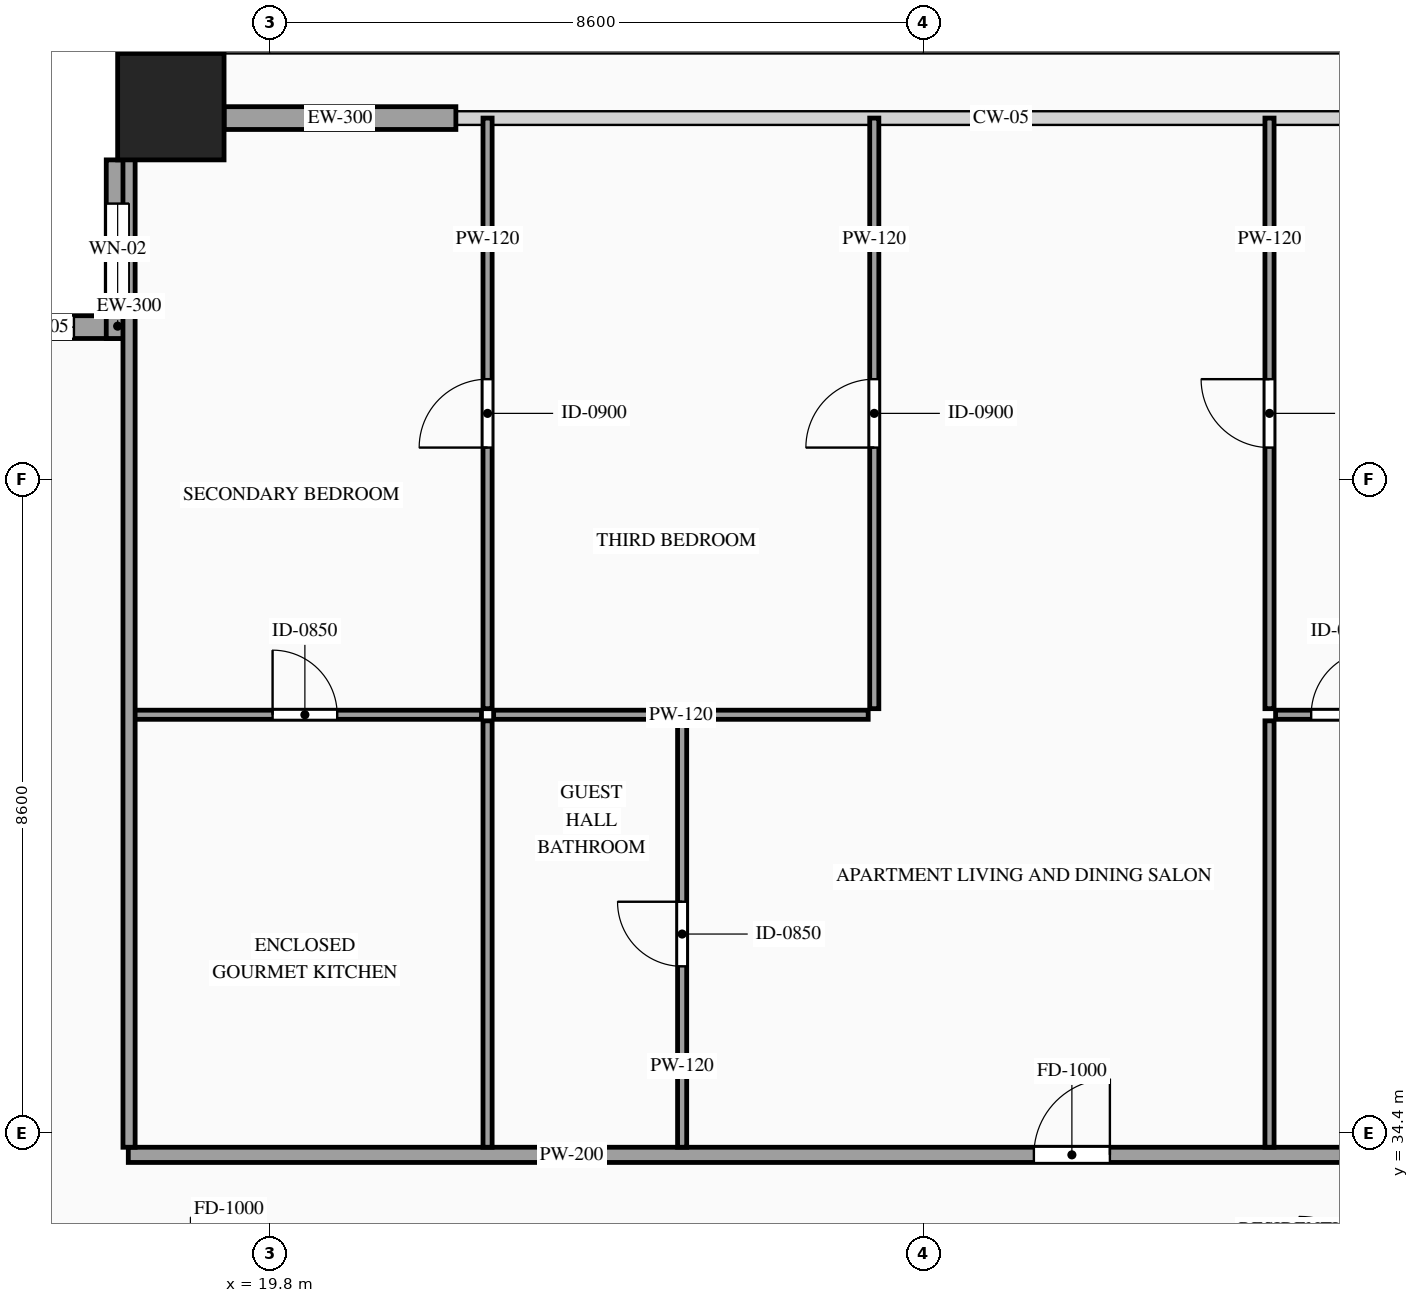
"""IFC4 building model, lengths in metres.
Left out: names, types, materials, properties, quantities, classifications, styles, units other than length and angle.
Written with IfcOpenShell. Run it as: python <this file> out.ifc"""

import sys

from ifc_helpers import new_model, si_unit, direction, frame, frame_2d, origin, origin_2d, place, context, subcontext, project, spatial, rectangle, hollow_rectangle, extrude, source, transform, mapped, element, fill, save


model = new_model("IFC4")
c1 = context("Model", 3, precision=1e-05, world=origin(), true_north=direction((0.0, 1.0)))
c2 = subcontext(c1, "Body", "Model", "MODEL_VIEW")
j1 = project(units=[si_unit("LENGTHUNIT", "METRE"), si_unit("PLANEANGLEUNIT", "RADIAN")], contexts=[c1])
p1 = place(None, origin())
s1 = spatial("IfcSite", under=j1, at=p1, CompositionType="ELEMENT")
p2 = place(p1, origin())
s2 = spatial("IfcBuilding", under=s1, at=p2, CompositionType="ELEMENT")
p3 = place(p2, frame((0.0, 0.0, 191.5)))
s3 = spatial("IfcBuildingStorey", under=s2, at=p3, CompositionType="ELEMENT", Elevation=191.5)
m1 = source(origin(), c2, "Body", "SweptSolid", [
    extrude(hollow_rectangle(XDim=1.4, YDim=1.4, WallThickness=0.06, at=origin_2d()), origin(), (0.0, 0.0, 1.0), 3.5),
])
p4 = place(p3, frame((18.5, 47.9, 0.0), z_axis=(0.0, 0.0, 1.0), x_axis=(1.0, 0.0, 0.0)))
e1 = element("IfcColumn", 1, at=p4, inside=s3, PredefinedType="COLUMN", context=c2, shape_type="MappedRepresentation", body=[
    mapped(m1, transform((0.0, 0.0, 0.0), scale=1.0)),
])
p5 = place(p3, frame((17.95, 45.0, 0.0), z_axis=(0.0, 0.0, 1.0), x_axis=(-1.0, 0.0, 0.0)))
e2 = element("IfcWall", 2, at=p5, inside=s3, PredefinedType="SOLIDWALL", context=c2, shape_type="SweptSolid", body=[
    extrude(rectangle(XDim=2.35, YDim=0.3, at=frame_2d((1.175, 0.0))), origin(), (0.0, 0.0, 1.0), 3.28),
])
p6 = place(p5, frame((0.725, 0.0, 0.85)))
e3 = element("IfcOpeningElement", 3, at=p6, cuts=e2, PredefinedType="OPENING", context=c2, shape_type="SweptSolid", body=[
    extrude(rectangle(XDim=0.9, YDim=1.5, at=frame_2d((0.45, 0.75))), frame((0.0, 0.165, 0.0), z_axis=(0.0, -1.0, 0.0), x_axis=(1.0, 0.0, 0.0)), (0.0, 0.0, 1.0), 0.33),
])
p7 = place(p3, frame((17.8, 47.2, 0.0), z_axis=(0.0, 0.0, 1.0), x_axis=(0.0, -1.0, 0.0)))
e4 = element("IfcWall", 4, at=p7, inside=s3, PredefinedType="SOLIDWALL", context=c2, shape_type="SweptSolid", body=[
    extrude(rectangle(XDim=2.35, YDim=0.3, at=frame_2d((1.175, 0.0))), origin(), (0.0, 0.0, 1.0), 3.28),
])
p8 = place(p7, frame((0.575, 0.0, 0.85)))
e5 = element("IfcOpeningElement", 5, at=p8, cuts=e4, PredefinedType="OPENING", context=c2, shape_type="SweptSolid", body=[
    extrude(rectangle(XDim=1.2, YDim=2.1, at=frame_2d((0.6, 1.05))), frame((0.0, 0.165, 0.0), z_axis=(0.0, -1.0, 0.0), x_axis=(1.0, 0.0, 0.0)), (0.0, 0.0, 1.0), 0.33),
])
m2 = source(origin(), c2, "Body", "SweptSolid", [
    extrude(rectangle(XDim=3.05, YDim=0.3, at=frame_2d((1.525, 0.0))), origin(), (0.0, 0.0, 1.0), 2.835),
])
p9 = place(p3, frame((19.2, 47.75, 0.0), z_axis=(0.0, 0.0, 1.0), x_axis=(1.0, 0.0, 0.0)))
e6 = element("IfcWall", 6, at=p9, inside=s3, PredefinedType="SOLIDWALL", context=c2, shape_type="MappedRepresentation", body=[
    mapped(m2, transform((0.0, 0.0, 0.0), scale=1.0)),
])
p10 = place(p3, frame((17.94, 34.11, 0.0), z_axis=(0.0, 0.0, 1.0), x_axis=(1.0, 0.0, 0.0)))
e7 = element("IfcWall", 7, at=p10, inside=s3, PredefinedType="PARTITIONING", context=c2, shape_type="SweptSolid", body=[
    extrude(rectangle(XDim=19.742, YDim=0.2, at=frame_2d((9.871, 0.0))), origin(), (0.0, 0.0, 1.0), 3.28),
])
p11 = place(p10, frame((11.915, 0.0, 0.0)))
e8 = element("IfcOpeningElement", 8, at=p11, cuts=e7, PredefinedType="OPENING", context=c2, shape_type="SweptSolid", body=[
    extrude(rectangle(XDim=1.0, YDim=2.2, at=frame_2d((0.5, 1.1))), frame((0.0, 0.115, 0.0), z_axis=(0.0, -1.0, 0.0), x_axis=(1.0, 0.0, 0.0)), (0.0, 0.0, 1.0), 0.23),
])
p12 = place(p3, frame((17.94, 39.9, 0.0), z_axis=(0.0, 0.0, 1.0), x_axis=(1.0, 0.0, 0.0)))
e9 = element("IfcWall", 9, at=p12, inside=s3, PredefinedType="PARTITIONING", context=c2, shape_type="SweptSolid", body=[
    extrude(rectangle(XDim=4.647, YDim=0.12, at=frame_2d((2.323, 0.0))), origin(), (0.0, 0.0, 1.0), 3.28),
])
p13 = place(p12, frame((1.898, 0.0, 0.0)))
e10 = element("IfcOpeningElement", 10, at=p13, cuts=e9, PredefinedType="OPENING", context=c2, shape_type="SweptSolid", body=[
    extrude(rectangle(XDim=0.85, YDim=2.1, at=frame_2d((0.425, 1.05))), frame((0.0, 0.075, 0.0), z_axis=(0.0, -1.0, 0.0), x_axis=(1.0, 0.0, 0.0)), (0.0, 0.0, 1.0), 0.15),
])
m3 = source(origin(), c2, "Body", "SweptSolid", [
    extrude(rectangle(XDim=5.61, YDim=0.12, at=frame_2d((2.805, 0.0))), origin(), (0.0, 0.0, 1.0), 3.28),
])
p14 = place(p3, frame((22.667, 34.21, 0.0), z_axis=(0.0, 0.0, 1.0), x_axis=(0.0, 1.0, 0.0)))
e11 = element("IfcWall", 11, at=p14, inside=s3, PredefinedType="PARTITIONING", context=c2, shape_type="MappedRepresentation", body=[
    mapped(m3, transform((0.0, 0.0, 0.0), scale=1.0)),
])
p15 = place(p3, frame((25.227, 34.21, 0.0), z_axis=(0.0, 0.0, 1.0), x_axis=(0.0, 1.0, 0.0)))
e12 = element("IfcWall", 12, at=p15, inside=s3, PredefinedType="PARTITIONING", context=c2, shape_type="SweptSolid", body=[
    extrude(rectangle(XDim=5.61, YDim=0.12, at=frame_2d((2.805, 0.0))), origin(), (0.0, 0.0, 1.0), 3.28),
])
p16 = place(p15, frame((2.38, 0.0, 0.0)))
e13 = element("IfcOpeningElement", 13, at=p16, cuts=e12, PredefinedType="OPENING", context=c2, shape_type="SweptSolid", body=[
    extrude(rectangle(XDim=0.85, YDim=2.1, at=frame_2d((0.425, 1.05))), frame((0.0, 0.075, 0.0), z_axis=(0.0, -1.0, 0.0), x_axis=(1.0, 0.0, 0.0)), (0.0, 0.0, 1.0), 0.15),
])
p17 = place(p3, frame((32.955, 34.21, 0.0), z_axis=(0.0, 0.0, 1.0), x_axis=(0.0, 1.0, 0.0)))
e14 = element("IfcWall", 14, at=p17, inside=s3, PredefinedType="PARTITIONING", context=c2, shape_type="MappedRepresentation", body=[
    mapped(m3, transform((0.0, 0.0, 0.0), scale=1.0)),
])
p18 = place(p3, frame((22.667, 39.98, 0.0), z_axis=(0.0, 0.0, 1.0), x_axis=(0.0, 1.0, 0.0)))
e15 = element("IfcWall", 15, at=p18, inside=s3, PredefinedType="PARTITIONING", context=c2, shape_type="SweptSolid", body=[
    extrude(rectangle(XDim=7.77, YDim=0.12, at=frame_2d((3.885, 0.0))), origin(), (0.0, 0.0, 1.0), 3.28),
])
p19 = place(p18, frame((3.435, 0.0, 0.0)))
e16 = element("IfcOpeningElement", 16, at=p19, cuts=e15, PredefinedType="OPENING", context=c2, shape_type="SweptSolid", body=[
    extrude(rectangle(XDim=0.9, YDim=2.15, at=frame_2d((0.45, 1.075))), frame((0.0, 0.075, 0.0), z_axis=(0.0, -1.0, 0.0), x_axis=(1.0, 0.0, 0.0)), (0.0, 0.0, 1.0), 0.15),
])
p20 = place(p3, frame((33.035, 39.9, 0.0), z_axis=(0.0, 0.0, 1.0), x_axis=(1.0, 0.0, 0.0)))
e17 = element("IfcWall", 17, at=p20, inside=s3, PredefinedType="PARTITIONING", context=c2, shape_type="SweptSolid", body=[
    extrude(rectangle(XDim=4.647, YDim=0.12, at=frame_2d((2.323, 0.0))), origin(), (0.0, 0.0, 1.0), 2.875),
])
p21 = place(p20, frame((2.872, 0.0, 0.0)))
e18 = element("IfcOpeningElement", 18, at=p21, cuts=e17, PredefinedType="OPENING", context=c2, shape_type="SweptSolid", body=[
    extrude(rectangle(XDim=0.85, YDim=2.1, at=frame_2d((0.425, 1.05))), frame((0.0, 0.075, 0.0), z_axis=(0.0, -1.0, 0.0), x_axis=(1.0, 0.0, 0.0)), (0.0, 0.0, 1.0), 0.15),
])
p22 = place(p20, frame((0.469, 0.0, 0.0)))
e19 = element("IfcOpeningElement", 19, at=p22, cuts=e17, PredefinedType="OPENING", context=c2, shape_type="SweptSolid", body=[
    extrude(rectangle(XDim=0.85, YDim=2.1, at=frame_2d((0.425, 1.05))), frame((0.0, 0.075, 0.0), z_axis=(0.0, -1.0, 0.0), x_axis=(1.0, 0.0, 0.0)), (0.0, 0.0, 1.0), 0.15),
])
p23 = place(p3, frame((32.955, 39.98, 0.0), z_axis=(0.0, 0.0, 1.0), x_axis=(0.0, 1.0, 0.0)))
e20 = element("IfcWall", 20, at=p23, inside=s3, PredefinedType="PARTITIONING", context=c2, shape_type="SweptSolid", body=[
    extrude(rectangle(XDim=7.77, YDim=0.12, at=frame_2d((3.885, 0.0))), origin(), (0.0, 0.0, 1.0), 3.28),
])
p24 = place(p23, frame((3.435, 0.0, 0.0)))
e21 = element("IfcOpeningElement", 21, at=p24, cuts=e20, PredefinedType="OPENING", context=c2, shape_type="SweptSolid", body=[
    extrude(rectangle(XDim=0.9, YDim=2.15, at=frame_2d((0.45, 1.075))), frame((0.0, 0.075, 0.0), z_axis=(0.0, -1.0, 0.0), x_axis=(1.0, 0.0, 0.0)), (0.0, 0.0, 1.0), 0.15),
])
m4 = source(origin(), c2, "Body", "SweptSolid", [
    extrude(rectangle(XDim=4.928, YDim=0.12, at=frame_2d((2.464, 0.0))), origin(), (0.0, 0.0, 1.0), 2.875),
])
p25 = place(p3, frame((22.747, 39.9, 0.0), z_axis=(0.0, 0.0, 1.0), x_axis=(1.0, 0.0, 0.0)))
e22 = element("IfcWall", 22, at=p25, inside=s3, PredefinedType="PARTITIONING", context=c2, shape_type="MappedRepresentation", body=[
    mapped(m4, transform((0.0, 0.0, 0.0), scale=1.0)),
])
p26 = place(p3, frame((27.755, 39.98, 0.0), z_axis=(0.0, 0.0, 1.0), x_axis=(0.0, 1.0, 0.0)))
e23 = element("IfcWall", 23, at=p26, inside=s3, PredefinedType="PARTITIONING", context=c2, shape_type="SweptSolid", body=[
    extrude(rectangle(XDim=7.77, YDim=0.12, at=frame_2d((3.885, 0.0))), origin(), (0.0, 0.0, 1.0), 3.28),
])
p27 = place(p26, frame((3.435, 0.0, 0.0)))
e24 = element("IfcOpeningElement", 24, at=p27, cuts=e23, PredefinedType="OPENING", context=c2, shape_type="SweptSolid", body=[
    extrude(rectangle(XDim=0.9, YDim=2.15, at=frame_2d((0.45, 1.075))), frame((0.0, 0.075, 0.0), z_axis=(0.0, -1.0, 0.0), x_axis=(1.0, 0.0, 0.0)), (0.0, 0.0, 1.0), 0.15),
])
m5 = source(origin(), c2, "Body", "SweptSolid", [
    extrude(rectangle(XDim=13.39, YDim=0.16, at=frame_2d((6.695, 0.0))), origin(), (0.0, 0.0, 1.0), 3.28),
])
p28 = place(p3, frame((17.95, 34.21, 0.0), z_axis=(0.0, 0.0, 1.0), x_axis=(0.0, 1.0, 0.0)))
e25 = element("IfcWall", 25, at=p28, inside=s3, PredefinedType="PARTITIONING", context=c2, shape_type="MappedRepresentation", body=[
    mapped(m5, transform((0.0, 0.0, 0.0), scale=1.0)),
])
m6 = source(origin(), c2, "Body", "SweptSolid", [
    extrude(rectangle(XDim=0.9, YDim=1.5, at=frame_2d((0.45, 0.75))), frame((0.0, 0.03, 0.0), z_axis=(0.0, -1.0, 0.0), x_axis=(1.0, 0.0, 0.0)), (0.0, 0.0, 1.0), 0.06),
])
p29 = place(p6, origin())
e26 = element("IfcWindow", 26, at=p29, inside=s3, PartitioningType="SINGLE_PANEL", PredefinedType="WINDOW", context=c2, shape_type="MappedRepresentation", body=[
    mapped(m6, transform((0.0, 0.0, 0.0), scale=1.0)),
])
fill(e3, e26)
m7 = source(origin(), c2, "Body", "SweptSolid", [
    extrude(rectangle(XDim=1.2, YDim=2.1, at=frame_2d((0.6, 1.05))), frame((0.0, 0.03, 0.0), z_axis=(0.0, -1.0, 0.0), x_axis=(1.0, 0.0, 0.0)), (0.0, 0.0, 1.0), 0.06),
])
p30 = place(p8, origin())
e27 = element("IfcWindow", 27, at=p30, inside=s3, PartitioningType="SINGLE_PANEL", PredefinedType="WINDOW", context=c2, shape_type="MappedRepresentation", body=[
    mapped(m7, transform((0.0, 0.0, 0.0), scale=1.0)),
])
fill(e5, e27)
m8 = source(origin(), c2, "Body", "SweptSolid", [
    extrude(rectangle(XDim=1.0, YDim=2.2, at=frame_2d((0.5, 1.1))), frame((0.0, 0.025, 0.0), z_axis=(0.0, -1.0, 0.0), x_axis=(1.0, 0.0, 0.0)), (0.0, 0.0, 1.0), 0.05),
])
p31 = place(p11, origin())
e28 = element("IfcDoor", 28, at=p31, inside=s3, OperationType="SINGLE_SWING_RIGHT", PredefinedType="DOOR", context=c2, shape_type="MappedRepresentation", body=[
    mapped(m8, transform((0.0, 0.0, 0.0), scale=1.0)),
])
fill(e8, e28)
m9 = source(origin(), c2, "Body", "SweptSolid", [
    extrude(rectangle(XDim=0.85, YDim=2.1, at=frame_2d((0.425, 1.05))), frame((0.0, 0.025, 0.0), z_axis=(0.0, -1.0, 0.0), x_axis=(1.0, 0.0, 0.0)), (0.0, 0.0, 1.0), 0.05),
])
p32 = place(p13, origin())
e29 = element("IfcDoor", 29, at=p32, inside=s3, OperationType="SINGLE_SWING_LEFT", PredefinedType="DOOR", context=c2, shape_type="MappedRepresentation", body=[
    mapped(m9, transform((0.0, 0.0, 0.0), scale=1.0)),
])
fill(e10, e29)
p33 = place(p16, origin())
e30 = element("IfcDoor", 30, at=p33, inside=s3, OperationType="SINGLE_SWING_RIGHT", PredefinedType="DOOR", context=c2, shape_type="MappedRepresentation", body=[
    mapped(m9, transform((0.0, 0.0, 0.0), scale=1.0)),
])
fill(e13, e30)
p34 = place(p22, origin())
e31 = element("IfcDoor", 31, at=p34, inside=s3, OperationType="SINGLE_SWING_RIGHT", PredefinedType="DOOR", context=c2, shape_type="MappedRepresentation", body=[
    mapped(m9, transform((0.0, 0.0, 0.0), scale=1.0)),
])
fill(e19, e31)
m10 = source(origin(), c2, "Body", "SweptSolid", [
    extrude(rectangle(XDim=0.9, YDim=2.15, at=frame_2d((0.45, 1.075))), frame((0.0, 0.025, 0.0), z_axis=(0.0, -1.0, 0.0), x_axis=(1.0, 0.0, 0.0)), (0.0, 0.0, 1.0), 0.05),
])
p35 = place(p19, origin())
e32 = element("IfcDoor", 32, at=p35, inside=s3, OperationType="SINGLE_SWING_LEFT", PredefinedType="DOOR", context=c2, shape_type="MappedRepresentation", body=[
    mapped(m10, transform((0.0, 0.0, 0.0), scale=1.0)),
])
fill(e16, e32)
p36 = place(p24, origin())
e33 = element("IfcDoor", 33, at=p36, inside=s3, OperationType="SINGLE_SWING_RIGHT", PredefinedType="DOOR", context=c2, shape_type="MappedRepresentation", body=[
    mapped(m10, transform((0.0, 0.0, 0.0), scale=1.0)),
])
fill(e21, e33)
p37 = place(p27, origin())
e34 = element("IfcDoor", 34, at=p37, inside=s3, OperationType="SINGLE_SWING_LEFT", PredefinedType="DOOR", context=c2, shape_type="MappedRepresentation", body=[
    mapped(m10, transform((0.0, 0.0, 0.0), scale=1.0)),
])
fill(e24, e34)
save(model, sys.argv[1])
